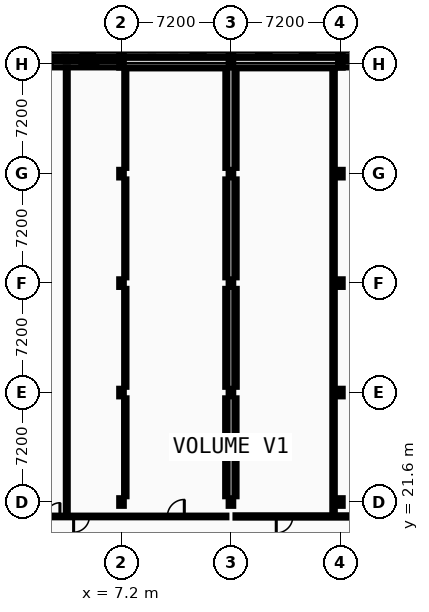
"""IFC4 building model, lengths in metres.
Left out: names, types, materials, properties, quantities, classifications, styles, units other than length and angle.
Written with IfcOpenShell. Run it as: python <this file> out.ifc"""

import sys

from ifc_helpers import new_model, si_unit, direction, frame, frame_2d, origin, origin_2d, place, context, subcontext, project, spatial, rectangle, i_section, extrude, element, fill, save


model = new_model("IFC4")
c1 = context("Model", 3, precision=1e-05, world=origin(), true_north=direction((0.0, 1.0)))
c2 = subcontext(c1, "Body", "Model", "MODEL_VIEW")
j1 = project(units=[si_unit("LENGTHUNIT", "METRE"), si_unit("PLANEANGLEUNIT", "RADIAN")], contexts=[c1])
p1 = place(None, origin())
s1 = spatial("IfcSite", under=j1, at=p1, CompositionType="ELEMENT")
p2 = place(p1, origin())
s2 = spatial("IfcBuilding", under=s1, at=p2, CompositionType="ELEMENT")
p3 = place(p2, origin())
s3 = spatial("IfcBuildingStorey", under=s2, at=p3, CompositionType="ELEMENT", Elevation=0.0)
for number, where, z_axis, x_axis in (
    (1, (7.2, 21.6, 0.0), (0.0, 0.0, 1.0), (1.0, 0.0, 0.0)),
    (2, (7.2, 28.8, 0.0), (0.0, 0.0, 1.0), (1.0, 0.0, 0.0)),
    (3, (7.2, 36.0, 0.0), (0.0, 0.0, 1.0), (1.0, 0.0, 0.0)),
    (4, (7.2, 43.2, 0.0), (0.0, 0.0, 1.0), (1.0, 0.0, 0.0)),
):
    element("IfcColumn", number, at=place(p3, frame(where, z_axis=z_axis, x_axis=x_axis)), inside=s3, PredefinedType="COLUMN", context=c2, shape_type="SweptSolid", body=[
        extrude(i_section(OverallWidth=0.3, OverallDepth=0.5, WebThickness=0.014, FlangeThickness=0.028, FilletRadius=0.027, at=origin_2d()), origin(), (0.0, 0.0, 1.0), 5.2),
    ])
p4 = place(p3, frame((7.2, 50.4, 0.0), z_axis=(0.0, 0.0, 1.0), x_axis=(1.0, 0.0, 0.0)))
e5 = element("IfcColumn", 5, at=p4, inside=s3, PredefinedType="COLUMN", context=c2, shape_type="SweptSolid", body=[
    extrude(i_section(OverallWidth=0.3, OverallDepth=0.45, WebThickness=0.014, FlangeThickness=0.026, FilletRadius=0.027, at=origin_2d()), origin(), (0.0, 0.0, 1.0), 5.2),
])
p5 = place(p3, frame((7.2, 51.12, 0.0), z_axis=(0.0, 0.0, 1.0), x_axis=(1.0, 0.0, 0.0)))
e6 = element("IfcColumn", 6, at=p5, inside=s3, PredefinedType="COLUMN", context=c2, shape_type="SweptSolid", body=[
    extrude(i_section(OverallWidth=0.3, OverallDepth=0.36, WebThickness=0.012, FlangeThickness=0.022, FilletRadius=0.027, at=origin_2d()), origin(), (0.0, 0.0, 1.0), 5.2),
])
for number, where, z_axis, x_axis in (
    (7, (14.4, 21.6, 0.0), (0.0, 0.0, 1.0), (1.0, 0.0, 0.0)),
    (8, (14.4, 28.8, 0.0), (0.0, 0.0, 1.0), (1.0, 0.0, 0.0)),
    (9, (14.4, 36.0, 0.0), (0.0, 0.0, 1.0), (1.0, 0.0, 0.0)),
    (10, (14.4, 43.2, 0.0), (0.0, 0.0, 1.0), (1.0, 0.0, 0.0)),
):
    element("IfcColumn", number, at=place(p3, frame(where, z_axis=z_axis, x_axis=x_axis)), inside=s3, PredefinedType="COLUMN", context=c2, shape_type="SweptSolid", body=[
        extrude(i_section(OverallWidth=0.3, OverallDepth=0.5, WebThickness=0.014, FlangeThickness=0.028, FilletRadius=0.027, at=origin_2d()), origin(), (0.0, 0.0, 1.0), 5.2),
    ])
p6 = place(p3, frame((14.4, 50.4, 0.0), z_axis=(0.0, 0.0, 1.0), x_axis=(1.0, 0.0, 0.0)))
e11 = element("IfcColumn", 11, at=p6, inside=s3, PredefinedType="COLUMN", context=c2, shape_type="SweptSolid", body=[
    extrude(i_section(OverallWidth=0.3, OverallDepth=0.45, WebThickness=0.014, FlangeThickness=0.026, FilletRadius=0.027, at=origin_2d()), origin(), (0.0, 0.0, 1.0), 5.2),
])
p7 = place(p3, frame((14.4, 51.12, 0.0), z_axis=(0.0, 0.0, 1.0), x_axis=(1.0, 0.0, 0.0)))
e12 = element("IfcColumn", 12, at=p7, inside=s3, PredefinedType="COLUMN", context=c2, shape_type="SweptSolid", body=[
    extrude(i_section(OverallWidth=0.3, OverallDepth=0.36, WebThickness=0.012, FlangeThickness=0.022, FilletRadius=0.027, at=origin_2d()), origin(), (0.0, 0.0, 1.0), 5.2),
])
for number, where, z_axis, x_axis in (
    (13, (21.6, 21.6, 0.0), (0.0, 0.0, 1.0), (1.0, 0.0, 0.0)),
    (14, (21.6, 28.8, 0.0), (0.0, 0.0, 1.0), (1.0, 0.0, 0.0)),
    (15, (21.6, 36.0, 0.0), (0.0, 0.0, 1.0), (1.0, 0.0, 0.0)),
    (16, (21.6, 43.2, 0.0), (0.0, 0.0, 1.0), (1.0, 0.0, 0.0)),
):
    element("IfcColumn", number, at=place(p3, frame(where, z_axis=z_axis, x_axis=x_axis)), inside=s3, PredefinedType="COLUMN", context=c2, shape_type="SweptSolid", body=[
        extrude(i_section(OverallWidth=0.3, OverallDepth=0.5, WebThickness=0.014, FlangeThickness=0.028, FilletRadius=0.027, at=origin_2d()), origin(), (0.0, 0.0, 1.0), 5.2),
    ])
p8 = place(p3, frame((21.6, 50.4, 0.0), z_axis=(0.0, 0.0, 1.0), x_axis=(1.0, 0.0, 0.0)))
e17 = element("IfcColumn", 17, at=p8, inside=s3, PredefinedType="COLUMN", context=c2, shape_type="SweptSolid", body=[
    extrude(i_section(OverallWidth=0.3, OverallDepth=0.45, WebThickness=0.014, FlangeThickness=0.026, FilletRadius=0.027, at=origin_2d()), origin(), (0.0, 0.0, 1.0), 5.2),
])
p9 = place(p3, frame((21.6, 51.12, 0.0), z_axis=(0.0, 0.0, 1.0), x_axis=(1.0, 0.0, 0.0)))
e18 = element("IfcColumn", 18, at=p9, inside=s3, PredefinedType="COLUMN", context=c2, shape_type="SweptSolid", body=[
    extrude(i_section(OverallWidth=0.3, OverallDepth=0.36, WebThickness=0.012, FlangeThickness=0.022, FilletRadius=0.027, at=origin_2d()), origin(), (0.0, 0.0, 1.0), 5.2),
])
p10 = place(p3, frame((7.31, 50.4, 0.0), z_axis=(0.0, 0.0, 1.0), x_axis=(-1.0, 0.0, 0.0)))
e19 = element("IfcWall", 19, at=p10, inside=s3, PredefinedType="STANDARD", context=c2, shape_type="SweptSolid", body=[
    extrude(rectangle(XDim=7.52, YDim=0.42, at=frame_2d((3.76, 0.0))), origin(), (0.0, 0.0, 1.0), 4.665),
])
p11 = place(p10, frame((1.656, 0.0, 0.9)))
e20 = element("IfcOpeningElement", 20, at=p11, cuts=e19, PredefinedType="OPENING", context=c2, shape_type="SweptSolid", body=[
    extrude(rectangle(XDim=1.2, YDim=1.8, at=frame_2d((0.6, 0.9))), frame((0.0, 0.22, 0.0), z_axis=(0.0, -1.0, 0.0), x_axis=(1.0, 0.0, 0.0)), (0.0, 0.0, 1.0), 0.44),
])
p12 = place(p10, frame((4.664, 0.0, 0.9)))
e21 = element("IfcOpeningElement", 21, at=p12, cuts=e19, PredefinedType="OPENING", context=c2, shape_type="SweptSolid", body=[
    extrude(rectangle(XDim=1.2, YDim=1.8, at=frame_2d((0.6, 0.9))), frame((0.0, 0.22, 0.0), z_axis=(0.0, -1.0, 0.0), x_axis=(1.0, 0.0, 0.0)), (0.0, 0.0, 1.0), 0.44),
])
p13 = place(p3, frame((28.8, 50.4, 0.0), z_axis=(0.0, 0.0, 1.0), x_axis=(-1.0, 0.0, 0.0)))
e22 = element("IfcWall", 22, at=p13, inside=s3, PredefinedType="STANDARD", context=c2, shape_type="SweptSolid", body=[
    extrude(rectangle(XDim=7.31, YDim=0.42, at=frame_2d((3.655, 0.0))), origin(), (0.0, 0.0, 1.0), 4.665),
])
p14 = place(p13, frame((1.743, 0.0, 1.1)))
e23 = element("IfcOpeningElement", 23, at=p14, cuts=e22, PredefinedType="OPENING", context=c2, shape_type="SweptSolid", body=[
    extrude(rectangle(XDim=0.9, YDim=1.6, at=frame_2d((0.45, 0.8))), frame((0.0, 0.22, 0.0), z_axis=(0.0, -1.0, 0.0), x_axis=(1.0, 0.0, 0.0)), (0.0, 0.0, 1.0), 0.44),
])
p15 = place(p13, frame((4.667, 0.0, 1.1)))
e24 = element("IfcOpeningElement", 24, at=p15, cuts=e22, PredefinedType="OPENING", context=c2, shape_type="SweptSolid", body=[
    extrude(rectangle(XDim=0.9, YDim=1.6, at=frame_2d((0.45, 0.8))), frame((0.0, 0.22, 0.0), z_axis=(0.0, -1.0, 0.0), x_axis=(1.0, 0.0, 0.0)), (0.0, 0.0, 1.0), 0.44),
])
p16 = place(p3, frame((-0.21, 51.12, 0.0), z_axis=(0.0, 0.0, 1.0), x_axis=(1.0, 0.0, 0.0)))
e25 = element("IfcWall", 25, at=p16, inside=s3, PredefinedType="STANDARD", context=c2, shape_type="SweptSolid", body=[
    extrude(rectangle(XDim=7.41, YDim=0.42, at=frame_2d((3.705, 0.0))), origin(), (0.0, 0.0, 1.0), 4.635),
])
p17 = place(p16, frame((1.776, 0.0, 0.95)))
e26 = element("IfcOpeningElement", 26, at=p17, cuts=e25, PredefinedType="OPENING", context=c2, shape_type="SweptSolid", body=[
    extrude(rectangle(XDim=0.894, YDim=1.404, at=frame_2d((0.447, 0.702))), frame((0.0, 0.22, 0.0), z_axis=(0.0, -1.0, 0.0), x_axis=(1.0, 0.0, 0.0)), (0.0, 0.0, 1.0), 0.44),
])
p18 = place(p16, frame((4.74, 0.0, 0.95)))
e27 = element("IfcOpeningElement", 27, at=p18, cuts=e25, PredefinedType="OPENING", context=c2, shape_type="SweptSolid", body=[
    extrude(rectangle(XDim=0.894, YDim=1.404, at=frame_2d((0.447, 0.702))), frame((0.0, 0.22, 0.0), z_axis=(0.0, -1.0, 0.0), x_axis=(1.0, 0.0, 0.0)), (0.0, 0.0, 1.0), 0.44),
])
p19 = place(p3, frame((7.2, 51.12, 0.0), z_axis=(0.0, 0.0, 1.0), x_axis=(1.0, 0.0, 0.0)))
e28 = element("IfcWall", 28, at=p19, inside=s3, PredefinedType="STANDARD", context=c2, shape_type="SweptSolid", body=[
    extrude(rectangle(XDim=7.2, YDim=0.42, at=frame_2d((3.6, 0.0))), origin(), (0.0, 0.0, 1.0), 4.635),
])
p20 = place(p19, frame((4.576, 0.0, 0.95)))
e29 = element("IfcOpeningElement", 29, at=p20, cuts=e28, PredefinedType="OPENING", context=c2, shape_type="SweptSolid", body=[
    extrude(rectangle(XDim=0.928, YDim=1.404, at=frame_2d((0.464, 0.702))), frame((0.0, 0.22, 0.0), z_axis=(0.0, -1.0, 0.0), x_axis=(1.0, 0.0, 0.0)), (0.0, 0.0, 1.0), 0.44),
])
p21 = place(p3, frame((14.4, 51.12, 0.0), z_axis=(0.0, 0.0, 1.0), x_axis=(1.0, 0.0, 0.0)))
e30 = element("IfcWall", 30, at=p21, inside=s3, PredefinedType="STANDARD", context=c2, shape_type="SweptSolid", body=[
    extrude(rectangle(XDim=7.2, YDim=0.42, at=frame_2d((3.6, 0.0))), origin(), (0.0, 0.0, 1.0), 4.635),
])
p22 = place(p21, frame((1.679, 0.0, 0.95)))
e31 = element("IfcOpeningElement", 31, at=p22, cuts=e30, PredefinedType="OPENING", context=c2, shape_type="SweptSolid", body=[
    extrude(rectangle(XDim=0.962, YDim=1.404, at=frame_2d((0.481, 0.702))), frame((0.0, 0.22, 0.0), z_axis=(0.0, -1.0, 0.0), x_axis=(1.0, 0.0, 0.0)), (0.0, 0.0, 1.0), 0.44),
])
p23 = place(p21, frame((4.559, 0.0, 0.95)))
e32 = element("IfcOpeningElement", 32, at=p23, cuts=e30, PredefinedType="OPENING", context=c2, shape_type="SweptSolid", body=[
    extrude(rectangle(XDim=0.962, YDim=1.404, at=frame_2d((0.481, 0.702))), frame((0.0, 0.22, 0.0), z_axis=(0.0, -1.0, 0.0), x_axis=(1.0, 0.0, 0.0)), (0.0, 0.0, 1.0), 0.44),
])
p24 = place(p3, frame((21.6, 51.12, 0.0), z_axis=(0.0, 0.0, 1.0), x_axis=(1.0, 0.0, 0.0)))
e33 = element("IfcWall", 33, at=p24, inside=s3, PredefinedType="STANDARD", context=c2, shape_type="SweptSolid", body=[
    extrude(rectangle(XDim=7.41, YDim=0.42, at=frame_2d((3.705, 0.0))), origin(), (0.0, 0.0, 1.0), 4.635),
])
p25 = place(p24, frame((1.725, 0.0, 0.95)))
e34 = element("IfcOpeningElement", 34, at=p25, cuts=e33, PredefinedType="OPENING", context=c2, shape_type="SweptSolid", body=[
    extrude(rectangle(XDim=0.996, YDim=1.404, at=frame_2d((0.498, 0.702))), frame((0.0, 0.22, 0.0), z_axis=(0.0, -1.0, 0.0), x_axis=(1.0, 0.0, 0.0)), (0.0, 0.0, 1.0), 0.44),
])
p26 = place(p24, frame((4.689, 0.0, 0.95)))
e35 = element("IfcOpeningElement", 35, at=p26, cuts=e33, PredefinedType="OPENING", context=c2, shape_type="SweptSolid", body=[
    extrude(rectangle(XDim=0.996, YDim=1.404, at=frame_2d((0.498, 0.702))), frame((0.0, 0.22, 0.0), z_axis=(0.0, -1.0, 0.0), x_axis=(1.0, 0.0, 0.0)), (0.0, 0.0, 1.0), 0.44),
])
p27 = place(p3, frame((0.23, 20.65, 0.0), z_axis=(0.0, 0.0, 1.0), x_axis=(1.0, 0.0, 0.0)))
e36 = element("IfcWall", 36, at=p27, inside=s3, PredefinedType="PARTITIONING", context=c2, shape_type="SweptSolid", body=[
    extrude(rectangle(XDim=13.87, YDim=0.11, at=frame_2d((6.935, 0.0))), origin(), (0.0, 0.0, 1.0), 4.97),
])
p28 = place(p27, frame((2.02, 0.0, 0.0)))
e37 = element("IfcOpeningElement", 37, at=p28, cuts=e36, PredefinedType="OPENING", context=c2, shape_type="SweptSolid", body=[
    extrude(rectangle(XDim=0.9, YDim=2.1, at=frame_2d((0.45, 1.05))), frame((0.0, 0.065, 0.0), z_axis=(0.0, -1.0, 0.0), x_axis=(1.0, 0.0, 0.0)), (0.0, 0.0, 1.0), 0.13),
])
p29 = place(p27, frame((3.82, 0.0, 0.0)))
e38 = element("IfcOpeningElement", 38, at=p29, cuts=e36, PredefinedType="OPENING", context=c2, shape_type="SweptSolid", body=[
    extrude(rectangle(XDim=1.036, YDim=2.068, at=frame_2d((0.518, 1.034))), frame((0.0, 0.065, 0.0), z_axis=(0.0, -1.0, 0.0), x_axis=(1.0, 0.0, 0.0)), (0.0, 0.0, 1.0), 0.13),
])
p30 = place(p27, frame((9.988, 0.0, 0.0)))
e39 = element("IfcOpeningElement", 39, at=p30, cuts=e36, PredefinedType="OPENING", context=c2, shape_type="SweptSolid", body=[
    extrude(rectangle(XDim=1.114, YDim=2.068, at=frame_2d((0.557, 1.034))), frame((0.0, 0.065, 0.0), z_axis=(0.0, -1.0, 0.0), x_axis=(1.0, 0.0, 0.0)), (0.0, 0.0, 1.0), 0.13),
])
p31 = place(p3, frame((14.7, 20.65, 0.0), z_axis=(0.0, 0.0, 1.0), x_axis=(1.0, 0.0, 0.0)))
e40 = element("IfcWall", 40, at=p31, inside=s3, PredefinedType="PARTITIONING", context=c2, shape_type="SweptSolid", body=[
    extrude(rectangle(XDim=13.87, YDim=0.15, at=frame_2d((6.935, 0.0))), origin(), (0.0, 0.0, 1.0), 4.97),
])
p32 = place(p31, frame((2.681, 0.0, 0.0)))
e41 = element("IfcOpeningElement", 41, at=p32, cuts=e40, PredefinedType="OPENING", context=c2, shape_type="SweptSolid", body=[
    extrude(rectangle(XDim=1.088, YDim=2.068, at=frame_2d((0.544, 1.034))), frame((0.0, 0.085, 0.0), z_axis=(0.0, -1.0, 0.0), x_axis=(1.0, 0.0, 0.0)), (0.0, 0.0, 1.0), 0.17),
])
p33 = place(p31, frame((9.59, 0.0, 0.0)))
e42 = element("IfcOpeningElement", 42, at=p33, cuts=e40, PredefinedType="OPENING", context=c2, shape_type="SweptSolid", body=[
    extrude(rectangle(XDim=1.14, YDim=2.068, at=frame_2d((0.57, 1.034))), frame((0.0, 0.085, 0.0), z_axis=(0.0, -1.0, 0.0), x_axis=(1.0, 0.0, 0.0)), (0.0, 0.0, 1.0), 0.17),
])
p34 = place(p3, frame((7.58, 50.2, 0.0), z_axis=(0.0, 0.0, 1.0), x_axis=(1.0, 0.0, 0.0)))
e43 = element("IfcWall", 43, at=p34, inside=s3, PredefinedType="PARTITIONING", context=c2, shape_type="SweptSolid", body=[
    extrude(rectangle(XDim=6.44, YDim=0.15, at=frame_2d((3.22, 0.0))), origin(), (0.0, 0.0, 1.0), 4.665),
])
p35 = place(p3, frame((14.78, 50.2, 0.0), z_axis=(0.0, 0.0, 1.0), x_axis=(1.0, 0.0, 0.0)))
e44 = element("IfcWall", 44, at=p35, inside=s3, PredefinedType="PARTITIONING", context=c2, shape_type="SweptSolid", body=[
    extrude(rectangle(XDim=6.44, YDim=0.142, at=frame_2d((3.22, 0.0))), origin(), (0.0, 0.0, 1.0), 4.665),
])
p36 = place(p3, frame((3.6, 20.705, 0.0), z_axis=(0.0, 0.0, 1.0), x_axis=(0.0, 1.0, 0.0)))
e45 = element("IfcWall", 45, at=p36, inside=s3, PredefinedType="PARTITIONING", context=c2, shape_type="SweptSolid", body=[
    extrude(rectangle(XDim=29.485, YDim=0.125, at=frame_2d((14.742, 0.0))), origin(), (0.0, 0.0, 1.0), 4.97),
])
p37 = place(p3, frame((7.45, 21.98, 0.0), z_axis=(0.0, 0.0, 1.0), x_axis=(0.0, 1.0, 0.0)))
e46 = element("IfcWall", 46, at=p37, inside=s3, PredefinedType="PARTITIONING", context=c2, shape_type="SweptSolid", body=[
    extrude(rectangle(XDim=6.44, YDim=0.16, at=frame_2d((3.22, 0.0))), origin(), (0.0, 0.0, 1.0), 4.665),
])
p38 = place(p3, frame((7.45, 29.18, 0.0), z_axis=(0.0, 0.0, 1.0), x_axis=(0.0, 1.0, 0.0)))
e47 = element("IfcWall", 47, at=p38, inside=s3, PredefinedType="PARTITIONING", context=c2, shape_type="SweptSolid", body=[
    extrude(rectangle(XDim=6.44, YDim=0.15, at=frame_2d((3.22, 0.0))), origin(), (0.0, 0.0, 1.0), 4.665),
])
p39 = place(p3, frame((7.45, 36.38, 0.0), z_axis=(0.0, 0.0, 1.0), x_axis=(0.0, 1.0, 0.0)))
e48 = element("IfcWall", 48, at=p39, inside=s3, PredefinedType="PARTITIONING", context=c2, shape_type="SweptSolid", body=[
    extrude(rectangle(XDim=6.44, YDim=0.142, at=frame_2d((3.22, 0.0))), origin(), (0.0, 0.0, 1.0), 4.665),
])
p40 = place(p3, frame((7.45, 43.58, 0.0), z_axis=(0.0, 0.0, 1.0), x_axis=(0.0, 1.0, 0.0)))
e49 = element("IfcWall", 49, at=p40, inside=s3, PredefinedType="PARTITIONING", context=c2, shape_type="SweptSolid", body=[
    extrude(rectangle(XDim=6.44, YDim=0.135, at=frame_2d((3.22, 0.0))), origin(), (0.0, 0.0, 1.0), 4.665),
])
p41 = place(p3, frame((14.1, 21.98, 0.0), z_axis=(0.0, 0.0, 1.0), x_axis=(0.0, 1.0, 0.0)))
e50 = element("IfcWall", 50, at=p41, inside=s3, PredefinedType="PARTITIONING", context=c2, shape_type="SweptSolid", body=[
    extrude(rectangle(XDim=6.44, YDim=0.16, at=frame_2d((3.22, 0.0))), origin(), (0.0, 0.0, 1.0), 4.665),
])
p42 = place(p3, frame((14.1, 29.18, 0.0), z_axis=(0.0, 0.0, 1.0), x_axis=(0.0, 1.0, 0.0)))
e51 = element("IfcWall", 51, at=p42, inside=s3, PredefinedType="PARTITIONING", context=c2, shape_type="SweptSolid", body=[
    extrude(rectangle(XDim=6.44, YDim=0.15, at=frame_2d((3.22, 0.0))), origin(), (0.0, 0.0, 1.0), 4.665),
])
p43 = place(p3, frame((14.1, 36.38, 0.0), z_axis=(0.0, 0.0, 1.0), x_axis=(0.0, 1.0, 0.0)))
e52 = element("IfcWall", 52, at=p43, inside=s3, PredefinedType="PARTITIONING", context=c2, shape_type="SweptSolid", body=[
    extrude(rectangle(XDim=6.44, YDim=0.142, at=frame_2d((3.22, 0.0))), origin(), (0.0, 0.0, 1.0), 4.665),
])
for number, where, z_axis, x_axis in (
    (53, (14.1, 43.58, 0.0), (0.0, 0.0, 1.0), (0.0, 1.0, 0.0)),
    (54, (14.7, 21.98, 0.0), (0.0, 0.0, 1.0), (0.0, 1.0, 0.0)),
):
    element("IfcWall", number, at=place(p3, frame(where, z_axis=z_axis, x_axis=x_axis)), inside=s3, PredefinedType="PARTITIONING", context=c2, shape_type="SweptSolid", body=[
        extrude(rectangle(XDim=6.44, YDim=0.135, at=frame_2d((3.22, 0.0))), origin(), (0.0, 0.0, 1.0), 4.97),
    ])
p44 = place(p3, frame((14.7, 29.18, 0.0), z_axis=(0.0, 0.0, 1.0), x_axis=(0.0, 1.0, 0.0)))
e55 = element("IfcWall", 55, at=p44, inside=s3, PredefinedType="PARTITIONING", context=c2, shape_type="SweptSolid", body=[
    extrude(rectangle(XDim=6.44, YDim=0.16, at=frame_2d((3.22, 0.0))), origin(), (0.0, 0.0, 1.0), 4.665),
])
p45 = place(p3, frame((14.7, 36.38, 0.0), z_axis=(0.0, 0.0, 1.0), x_axis=(0.0, 1.0, 0.0)))
e56 = element("IfcWall", 56, at=p45, inside=s3, PredefinedType="PARTITIONING", context=c2, shape_type="SweptSolid", body=[
    extrude(rectangle(XDim=6.44, YDim=0.15, at=frame_2d((3.22, 0.0))), origin(), (0.0, 0.0, 1.0), 4.665),
])
p46 = place(p3, frame((14.7, 43.58, 0.0), z_axis=(0.0, 0.0, 1.0), x_axis=(0.0, 1.0, 0.0)))
e57 = element("IfcWall", 57, at=p46, inside=s3, PredefinedType="PARTITIONING", context=c2, shape_type="SweptSolid", body=[
    extrude(rectangle(XDim=6.44, YDim=0.142, at=frame_2d((3.22, 0.0))), origin(), (0.0, 0.0, 1.0), 4.665),
])
p47 = place(p3, frame((21.15, 20.725, 0.0), z_axis=(0.0, 0.0, 1.0), x_axis=(0.0, 1.0, 0.0)))
e58 = element("IfcWall", 58, at=p47, inside=s3, PredefinedType="PARTITIONING", context=c2, shape_type="SweptSolid", body=[
    extrude(rectangle(XDim=29.404, YDim=0.16, at=frame_2d((14.702, 0.0))), origin(), (0.0, 0.0, 1.0), 4.97),
])
p48 = place(p11, origin())
e59 = element("IfcWindow", 59, at=p48, inside=s3, PartitioningType="SINGLE_PANEL", PredefinedType="WINDOW", context=c2, shape_type="SweptSolid", body=[
    extrude(rectangle(XDim=1.2, YDim=1.8, at=frame_2d((0.6, 0.9))), frame((0.0, 0.03, 0.0), z_axis=(0.0, -1.0, 0.0), x_axis=(1.0, 0.0, 0.0)), (0.0, 0.0, 1.0), 0.06),
])
fill(e20, e59)
p49 = place(p12, origin())
e60 = element("IfcWindow", 60, at=p49, inside=s3, PartitioningType="SINGLE_PANEL", PredefinedType="WINDOW", context=c2, shape_type="SweptSolid", body=[
    extrude(rectangle(XDim=1.2, YDim=1.8, at=frame_2d((0.6, 0.9))), frame((0.0, 0.03, 0.0), z_axis=(0.0, -1.0, 0.0), x_axis=(1.0, 0.0, 0.0)), (0.0, 0.0, 1.0), 0.06),
])
fill(e21, e60)
p50 = place(p18, origin())
e61 = element("IfcWindow", 61, at=p50, inside=s3, PartitioningType="SINGLE_PANEL", PredefinedType="WINDOW", context=c2, shape_type="SweptSolid", body=[
    extrude(rectangle(XDim=0.894, YDim=1.404, at=frame_2d((0.447, 0.702))), frame((0.0, 0.03, 0.0), z_axis=(0.0, -1.0, 0.0), x_axis=(1.0, 0.0, 0.0)), (0.0, 0.0, 1.0), 0.06),
])
fill(e27, e61)
p51 = place(p20, origin())
e62 = element("IfcWindow", 62, at=p51, inside=s3, PartitioningType="SINGLE_PANEL", PredefinedType="WINDOW", context=c2, shape_type="SweptSolid", body=[
    extrude(rectangle(XDim=0.928, YDim=1.404, at=frame_2d((0.464, 0.702))), frame((0.0, 0.03, 0.0), z_axis=(0.0, -1.0, 0.0), x_axis=(1.0, 0.0, 0.0)), (0.0, 0.0, 1.0), 0.06),
])
fill(e29, e62)
p52 = place(p22, origin())
e63 = element("IfcWindow", 63, at=p52, inside=s3, PartitioningType="SINGLE_PANEL", PredefinedType="WINDOW", context=c2, shape_type="SweptSolid", body=[
    extrude(rectangle(XDim=0.962, YDim=1.404, at=frame_2d((0.481, 0.702))), frame((0.0, 0.03, 0.0), z_axis=(0.0, -1.0, 0.0), x_axis=(1.0, 0.0, 0.0)), (0.0, 0.0, 1.0), 0.06),
])
fill(e31, e63)
p53 = place(p23, origin())
e64 = element("IfcWindow", 64, at=p53, inside=s3, PartitioningType="SINGLE_PANEL", PredefinedType="WINDOW", context=c2, shape_type="SweptSolid", body=[
    extrude(rectangle(XDim=0.962, YDim=1.404, at=frame_2d((0.481, 0.702))), frame((0.0, 0.03, 0.0), z_axis=(0.0, -1.0, 0.0), x_axis=(1.0, 0.0, 0.0)), (0.0, 0.0, 1.0), 0.06),
])
fill(e32, e64)
p54 = place(p28, frame((0.9, 0.0, 0.0), z_axis=(0.0, 0.0, 1.0), x_axis=(-1.0, 0.0, 0.0)))
e65 = element("IfcDoor", 65, at=p54, inside=s3, OperationType="SINGLE_SWING_RIGHT", PredefinedType="DOOR", context=c2, shape_type="SweptSolid", body=[
    extrude(rectangle(XDim=0.9, YDim=2.1, at=frame_2d((0.45, 1.05))), frame((0.0, 0.025, 0.0), z_axis=(0.0, -1.0, 0.0), x_axis=(1.0, 0.0, 0.0)), (0.0, 0.0, 1.0), 0.05),
])
fill(e37, e65)
p55 = place(p29, frame((1.036, 0.0, 0.0), z_axis=(0.0, 0.0, 1.0), x_axis=(-1.0, 0.0, 0.0)))
e66 = element("IfcDoor", 66, at=p55, inside=s3, OperationType="SINGLE_SWING_LEFT", PredefinedType="DOOR", context=c2, shape_type="SweptSolid", body=[
    extrude(rectangle(XDim=1.036, YDim=2.068, at=frame_2d((0.518, 1.034))), frame((0.0, 0.025, 0.0), z_axis=(0.0, -1.0, 0.0), x_axis=(1.0, 0.0, 0.0)), (0.0, 0.0, 1.0), 0.05),
])
fill(e38, e66)
p56 = place(p32, frame((1.088, 0.0, 0.0), z_axis=(0.0, 0.0, 1.0), x_axis=(-1.0, 0.0, 0.0)))
e67 = element("IfcDoor", 67, at=p56, inside=s3, OperationType="SINGLE_SWING_LEFT", PredefinedType="DOOR", context=c2, shape_type="SweptSolid", body=[
    extrude(rectangle(XDim=1.088, YDim=2.068, at=frame_2d((0.544, 1.034))), frame((0.0, 0.025, 0.0), z_axis=(0.0, -1.0, 0.0), x_axis=(1.0, 0.0, 0.0)), (0.0, 0.0, 1.0), 0.05),
])
fill(e41, e67)
p57 = place(p30, frame((1.114, 0.0, 0.0), z_axis=(0.0, 0.0, 1.0), x_axis=(-1.0, 0.0, 0.0)))
e68 = element("IfcDoor", 68, at=p57, inside=s3, OperationType="SINGLE_SWING_RIGHT", PredefinedType="DOOR", context=c2, shape_type="SweptSolid", body=[
    extrude(rectangle(XDim=1.114, YDim=2.068, at=frame_2d((0.557, 1.034))), frame((0.0, 0.025, 0.0), z_axis=(0.0, -1.0, 0.0), x_axis=(1.0, 0.0, 0.0)), (0.0, 0.0, 1.0), 0.05),
])
fill(e39, e68)
save(model, sys.argv[1])
